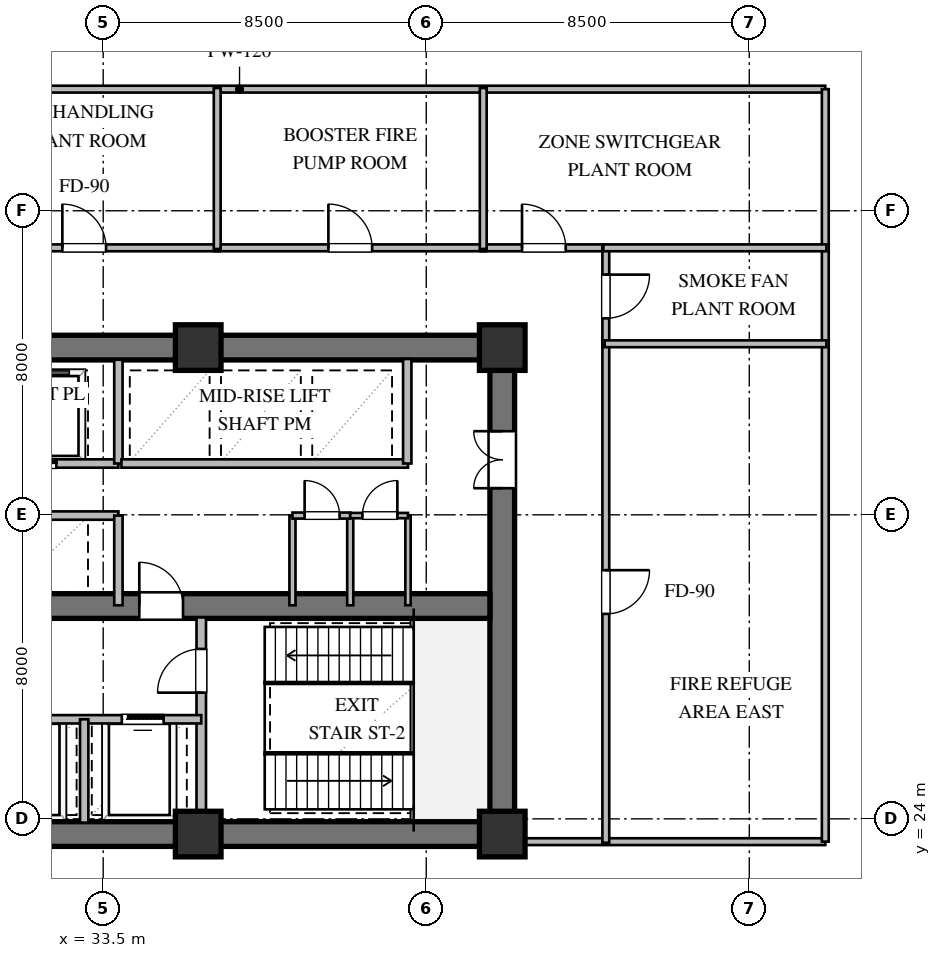
"""IFC4 building model, lengths in metres.
Left out: names, types, materials, properties, quantities, classifications, styles, units other than length and angle.
Written with IfcOpenShell. Run it as: python <this file> out.ifc"""

import sys

from ifc_helpers import new_model, si_unit, direction, frame, frame_2d, origin, origin_2d, place, context, subcontext, project, spatial, rectangle, extrude, element, fill, save


model = new_model("IFC4")
c1 = context("Model", 3, precision=1e-05, world=origin(), true_north=direction((0.0, 1.0)))
c2 = subcontext(c1, "Body", "Model", "MODEL_VIEW")
j1 = project(units=[si_unit("LENGTHUNIT", "METRE"), si_unit("PLANEANGLEUNIT", "RADIAN")], contexts=[c1])
p1 = place(None, origin())
s1 = spatial("IfcSite", under=j1, at=p1, CompositionType="ELEMENT")
p2 = place(p1, origin())
s2 = spatial("IfcBuilding", under=s1, at=p2, CompositionType="ELEMENT")
p3 = place(p2, frame((0.0, 0.0, 92.4)))
s3 = spatial("IfcBuildingStorey", under=s2, at=p3, CompositionType="ELEMENT", Elevation=92.4)
for number, where, z_axis, x_axis in (
    (1, (21.675, 23.6, 0.0), (0.0, 0.0, 1.0), (1.0, 0.0, 0.0)),
    (2, (21.675, 36.4, 0.0), (0.0, 0.0, 1.0), (1.0, 0.0, 0.0)),
):
    element("IfcWall", number, at=place(p3, frame(where, z_axis=z_axis, x_axis=x_axis)), inside=s3, PredefinedType="SHEAR", context=c2, shape_type="SweptSolid", body=[
        extrude(rectangle(XDim=22.65, YDim=0.65, at=frame_2d((11.325, 0.0))), origin(), (0.0, 0.0, 1.0), 5.08),
    ])
p4 = place(p3, frame((44.0, 23.925, 0.0), z_axis=(0.0, 0.0, 1.0), x_axis=(0.0, 1.0, 0.0)))
e3 = element("IfcWall", 3, at=p4, inside=s3, PredefinedType="SHEAR", context=c2, shape_type="SweptSolid", body=[
    extrude(rectangle(XDim=12.15, YDim=0.65, at=frame_2d((6.075, 0.0))), origin(), (0.0, 0.0, 1.0), 5.08),
])
p5 = place(p4, frame((8.775, 0.0, 0.0)))
e4 = element("IfcOpeningElement", 4, at=p5, cuts=e3, PredefinedType="OPENING", context=c2, shape_type="SweptSolid", body=[
    extrude(rectangle(XDim=1.5, YDim=2.15, at=frame_2d((0.75, 1.075))), frame((0.0, 0.335, 0.0), z_axis=(0.0, -1.0, 0.0), x_axis=(1.0, 0.0, 0.0)), (0.0, 0.0, 1.0), 0.67),
])
p6 = place(p3, frame((22.325, 29.6, 0.0), z_axis=(0.0, 0.0, 1.0), x_axis=(1.0, 0.0, 0.0)))
e5 = element("IfcWall", 5, at=p6, inside=s3, PredefinedType="SHEAR", context=c2, shape_type="SweptSolid", body=[
    extrude(rectangle(XDim=21.35, YDim=0.65, at=frame_2d((10.675, 0.0))), origin(), (0.0, 0.0, 1.0), 5.08),
])
p7 = place(p6, frame((12.125, 0.0, 0.0)))
e6 = element("IfcOpeningElement", 6, at=p7, cuts=e5, PredefinedType="OPENING", context=c2, shape_type="SweptSolid", body=[
    extrude(rectangle(XDim=1.15, YDim=2.1, at=frame_2d((0.575, 1.05))), frame((0.0, 0.335, 0.0), z_axis=(0.0, -1.0, 0.0), x_axis=(1.0, 0.0, 0.0)), (0.0, 0.0, 1.0), 0.67),
])
for number, where, z_axis, x_axis in (
    (7, (36.0, 23.6, 0.0), (0.0, 0.0, 1.0), (1.0, 0.0, 0.0)),
    (8, (44.0, 23.6, 0.0), (0.0, 0.0, 1.0), (1.0, 0.0, 0.0)),
    (9, (44.0, 36.4, 0.0), (0.0, 0.0, 1.0), (1.0, 0.0, 0.0)),
    (10, (36.0, 36.4, 0.0), (0.0, 0.0, 1.0), (1.0, 0.0, 0.0)),
):
    element("IfcColumn", number, at=place(p3, frame(where, z_axis=z_axis, x_axis=x_axis)), inside=s3, PredefinedType="COLUMN", context=c2, shape_type="SweptSolid", body=[
        extrude(rectangle(XDim=1.2, YDim=1.2, at=origin_2d()), origin(), (0.0, 0.0, 1.0), 5.4),
    ])
p8 = place(p3, frame((36.08, 23.9, 0.0), z_axis=(0.0, 0.0, 1.0), x_axis=(0.0, 1.0, 0.0)))
e11 = element("IfcWall", 11, at=p8, inside=s3, PredefinedType="SOLIDWALL", context=c2, shape_type="SweptSolid", body=[
    extrude(rectangle(XDim=5.4, YDim=0.25, at=frame_2d((2.7, 0.0))), origin(), (0.0, 0.0, 1.0), 5.08),
])
p9 = place(p8, frame((3.421, 0.0, 0.0)))
e12 = element("IfcOpeningElement", 12, at=p9, cuts=e11, PredefinedType="OPENING", context=c2, shape_type="SweptSolid", body=[
    extrude(rectangle(XDim=1.15, YDim=2.1, at=frame_2d((0.575, 1.05))), frame((0.0, 0.135, 0.0), z_axis=(0.0, -1.0, 0.0), x_axis=(1.0, 0.0, 0.0)), (0.0, 0.0, 1.0), 0.27),
])
p10 = place(p3, frame((29.92, 26.62, 0.0), z_axis=(0.0, 0.0, 1.0), x_axis=(1.0, 0.0, 0.0)))
e13 = element("IfcWall", 13, at=p10, inside=s3, PredefinedType="SOLIDWALL", context=c2, shape_type="SweptSolid", body=[
    extrude(rectangle(XDim=6.16, YDim=0.22, at=frame_2d((3.08, 0.0))), origin(), (0.0, 0.0, 1.0), 5.08),
])
p11 = place(p10, frame((0.99, 0.0, 0.0)))
e14 = element("IfcOpeningElement", 14, at=p11, cuts=e13, PredefinedType="OPENING", context=c2, shape_type="SweptSolid", body=[
    extrude(rectangle(XDim=1.1, YDim=2.1, at=frame_2d((0.55, 1.05))), frame((0.0, 0.12, 0.0), z_axis=(0.0, -1.0, 0.0), x_axis=(1.0, 0.0, 0.0)), (0.0, 0.0, 1.0), 0.24),
])
p12 = place(p10, frame((4.07, 0.0, 0.0)))
e15 = element("IfcOpeningElement", 15, at=p12, cuts=e13, PredefinedType="OPENING", context=c2, shape_type="SweptSolid", body=[
    extrude(rectangle(XDim=1.1, YDim=2.1, at=frame_2d((0.55, 1.05))), frame((0.0, 0.12, 0.0), z_axis=(0.0, -1.0, 0.0), x_axis=(1.0, 0.0, 0.0)), (0.0, 0.0, 1.0), 0.24),
])
p13 = place(p3, frame((33.0, 23.9, 0.0), z_axis=(0.0, 0.0, 1.0), x_axis=(0.0, 1.0, 0.0)))
e16 = element("IfcWall", 16, at=p13, inside=s3, PredefinedType="SOLIDWALL", context=c2, shape_type="SweptSolid", body=[
    extrude(rectangle(XDim=2.72, YDim=0.22, at=frame_2d((1.36, 0.0))), origin(), (0.0, 0.0, 1.0), 5.08),
])
p14 = place(p3, frame((26.1, 31.98, 0.0), z_axis=(0.0, 0.0, 1.0), x_axis=(1.0, 0.0, 0.0)))
e17 = element("IfcWall", 17, at=p14, inside=s3, PredefinedType="SOLIDWALL", context=c2, shape_type="SweptSolid", body=[
    extrude(rectangle(XDim=7.8, YDim=0.22, at=frame_2d((3.9, 0.0))), origin(), (0.0, 0.0, 1.0), 5.08),
])
p15 = place(p3, frame((33.9, 29.62, 0.0), z_axis=(0.0, 0.0, 1.0), x_axis=(0.0, 1.0, 0.0)))
e18 = element("IfcWall", 18, at=p15, inside=s3, PredefinedType="SOLIDWALL", context=c2, shape_type="SweptSolid", body=[
    extrude(rectangle(XDim=2.36, YDim=0.22, at=frame_2d((1.18, 0.0))), origin(), (0.0, 0.0, 1.0), 5.08),
])
p16 = place(p3, frame((26.1, 33.35, 0.0), z_axis=(0.0, 0.0, 1.0), x_axis=(1.0, 0.0, 0.0)))
e19 = element("IfcWall", 19, at=p16, inside=s3, PredefinedType="SOLIDWALL", context=c2, shape_type="SweptSolid", body=[
    extrude(rectangle(XDim=7.8, YDim=0.22, at=frame_2d((3.9, 0.0))), origin(), (0.0, 0.0, 1.0), 5.08),
])
p17 = place(p16, frame((1.4, 0.0, 0.0)))
e20 = element("IfcOpeningElement", 20, at=p17, cuts=e19, PredefinedType="OPENING", context=c2, shape_type="SweptSolid", body=[
    extrude(rectangle(XDim=1.1, YDim=2.1, at=frame_2d((0.55, 1.05))), frame((0.0, 0.12, 0.0), z_axis=(0.0, -1.0, 0.0), x_axis=(1.0, 0.0, 0.0)), (0.0, 0.0, 1.0), 0.24),
])
p18 = place(p16, frame((5.066, 0.0, 0.0)))
e21 = element("IfcOpeningElement", 21, at=p18, cuts=e19, PredefinedType="OPENING", context=c2, shape_type="SweptSolid", body=[
    extrude(rectangle(XDim=1.1, YDim=2.1, at=frame_2d((0.55, 1.05))), frame((0.0, 0.12, 0.0), z_axis=(0.0, -1.0, 0.0), x_axis=(1.0, 0.0, 0.0)), (0.0, 0.0, 1.0), 0.24),
])
p19 = place(p3, frame((33.9, 33.35, 0.0), z_axis=(0.0, 0.0, 1.0), x_axis=(0.0, 1.0, 0.0)))
e22 = element("IfcWall", 22, at=p19, inside=s3, PredefinedType="SOLIDWALL", context=c2, shape_type="SweptSolid", body=[
    extrude(rectangle(XDim=2.73, YDim=0.22, at=frame_2d((1.365, 0.0))), origin(), (0.0, 0.0, 1.0), 5.08),
])
p20 = place(p3, frame((33.98, 33.35, 0.0), z_axis=(0.0, 0.0, 1.0), x_axis=(1.0, 0.0, 0.0)))
e23 = element("IfcWall", 23, at=p20, inside=s3, PredefinedType="SOLIDWALL", context=c2, shape_type="SweptSolid", body=[
    extrude(rectangle(XDim=7.54, YDim=0.22, at=frame_2d((3.77, 0.0))), origin(), (0.0, 0.0, 1.0), 5.08),
])
p21 = place(p3, frame((41.5, 33.35, 0.0), z_axis=(0.0, 0.0, 1.0), x_axis=(0.0, 1.0, 0.0)))
e24 = element("IfcWall", 24, at=p21, inside=s3, PredefinedType="SOLIDWALL", context=c2, shape_type="SweptSolid", body=[
    extrude(rectangle(XDim=2.75, YDim=0.22, at=frame_2d((1.375, 0.0))), origin(), (0.0, 0.0, 1.0), 5.08),
])
for number, where, z_axis, x_axis in (
    (25, (38.48, 29.62, 0.0), (0.0, 0.0, 1.0), (0.0, 1.0, 0.0)),
    (26, (40.0, 29.62, 0.0), (0.0, 0.0, 1.0), (0.0, 1.0, 0.0)),
):
    element("IfcWall", number, at=place(p3, frame(where, z_axis=z_axis, x_axis=x_axis)), inside=s3, PredefinedType="PLUMBINGWALL", context=c2, shape_type="SweptSolid", body=[
        extrude(rectangle(XDim=2.36, YDim=0.16, at=frame_2d((1.18, 0.0))), origin(), (0.0, 0.0, 1.0), 5.08),
    ])
p22 = place(p3, frame((41.52, 29.62, 0.0), z_axis=(0.0, 0.0, 1.0), x_axis=(0.0, 1.0, 0.0)))
e27 = element("IfcWall", 27, at=p22, inside=s3, PredefinedType="PARTITIONING", context=c2, shape_type="SweptSolid", body=[
    extrude(rectangle(XDim=2.36, YDim=0.14, at=frame_2d((1.18, 0.0))), origin(), (0.0, 0.0, 1.0), 2.187),
])
p23 = place(p3, frame((38.48, 31.98, 0.0), z_axis=(0.0, 0.0, 1.0), x_axis=(1.0, 0.0, 0.0)))
e28 = element("IfcWall", 28, at=p23, inside=s3, PredefinedType="PLUMBINGWALL", context=c2, shape_type="SweptSolid", body=[
    extrude(rectangle(XDim=1.52, YDim=0.16, at=frame_2d((0.76, 0.0))), origin(), (0.0, 0.0, 1.0), 5.08),
])
p24 = place(p23, frame((0.32, 0.0, 0.0)))
e29 = element("IfcOpeningElement", 29, at=p24, cuts=e28, PredefinedType="OPENING", context=c2, shape_type="SweptSolid", body=[
    extrude(rectangle(XDim=0.92, YDim=2.1, at=frame_2d((0.46, 1.05))), frame((0.0, 0.09, 0.0), z_axis=(0.0, -1.0, 0.0), x_axis=(1.0, 0.0, 0.0)), (0.0, 0.0, 1.0), 0.18),
])
p25 = place(p3, frame((40.0, 31.98, 0.0), z_axis=(0.0, 0.0, 1.0), x_axis=(1.0, 0.0, 0.0)))
e30 = element("IfcWall", 30, at=p25, inside=s3, PredefinedType="PARTITIONING", context=c2, shape_type="SweptSolid", body=[
    extrude(rectangle(XDim=1.52, YDim=0.14, at=frame_2d((0.76, 0.0))), origin(), (0.0, 0.0, 1.0), 5.08),
])
p26 = place(p25, frame((0.32, 0.0, 0.0)))
e31 = element("IfcOpeningElement", 31, at=p26, cuts=e30, PredefinedType="OPENING", context=c2, shape_type="SweptSolid", body=[
    extrude(rectangle(XDim=0.92, YDim=2.1, at=frame_2d((0.46, 1.05))), frame((0.0, 0.08, 0.0), z_axis=(0.0, -1.0, 0.0), x_axis=(1.0, 0.0, 0.0)), (0.0, 0.0, 1.0), 0.16),
])
p27 = place(p3, frame((21.675, 43.2, 0.0), z_axis=(0.0, 0.0, 1.0), x_axis=(1.0, 0.0, 0.0)))
e32 = element("IfcWall", 32, at=p27, inside=s3, PredefinedType="PARTITIONING", context=c2, shape_type="SweptSolid", body=[
    extrude(rectangle(XDim=30.825, YDim=0.18, at=frame_2d((15.413, 0.0))), origin(), (0.0, 0.0, 1.0), 5.08),
])
p28 = place(p3, frame((44.325, 23.4, 0.0), z_axis=(0.0, 0.0, 1.0), x_axis=(1.0, 0.0, 0.0)))
e33 = element("IfcWall", 33, at=p28, inside=s3, PredefinedType="PARTITIONING", context=c2, shape_type="SweptSolid", body=[
    extrude(rectangle(XDim=8.175, YDim=0.18, at=frame_2d((4.087, 0.0))), origin(), (0.0, 0.0, 1.0), 3.57),
])
p29 = place(p3, frame((52.5, 23.4, 0.0), z_axis=(0.0, 0.0, 1.0), x_axis=(0.0, 1.0, 0.0)))
e34 = element("IfcWall", 34, at=p29, inside=s3, PredefinedType="PARTITIONING", context=c2, shape_type="SweptSolid", body=[
    extrude(rectangle(XDim=19.8, YDim=0.18, at=frame_2d((9.9, 0.0))), origin(), (0.0, 0.0, 1.0), 5.08),
])
p30 = place(p3, frame((46.725, 36.565, 0.0), z_axis=(0.0, 0.0, 1.0), x_axis=(0.0, -1.0, 0.0)))
e35 = element("IfcWall", 35, at=p30, inside=s3, PredefinedType="PARTITIONING", context=c2, shape_type="SweptSolid", body=[
    extrude(rectangle(XDim=13.195, YDim=0.18, at=frame_2d((6.597, 0.0))), origin(), (0.0, 0.0, 1.0), 5.08),
])
p31 = place(p30, frame((6.022, 0.0, 0.0)))
e36 = element("IfcOpeningElement", 36, at=p31, cuts=e35, PredefinedType="OPENING", context=c2, shape_type="SweptSolid", body=[
    extrude(rectangle(XDim=1.15, YDim=2.1, at=frame_2d((0.575, 1.05))), frame((0.0, 0.1, 0.0), z_axis=(0.0, -1.0, 0.0), x_axis=(1.0, 0.0, 0.0)), (0.0, 0.0, 1.0), 0.2),
])
p32 = place(p3, frame((29.435, 39.025, 0.0), z_axis=(0.0, 0.0, 1.0), x_axis=(1.0, 0.0, 0.0)))
e37 = element("IfcWall", 37, at=p32, inside=s3, PredefinedType="PARTITIONING", context=c2, shape_type="SweptSolid", body=[
    extrude(rectangle(XDim=7.13, YDim=0.18, at=frame_2d((3.565, 0.0))), origin(), (0.0, 0.0, 1.0), 5.08),
])
p33 = place(p32, frame((2.99, 0.0, 0.0)))
e38 = element("IfcOpeningElement", 38, at=p33, cuts=e37, PredefinedType="OPENING", context=c2, shape_type="SweptSolid", body=[
    extrude(rectangle(XDim=1.15, YDim=2.1, at=frame_2d((0.575, 1.05))), frame((0.0, 0.1, 0.0), z_axis=(0.0, -1.0, 0.0), x_axis=(1.0, 0.0, 0.0)), (0.0, 0.0, 1.0), 0.2),
])
p34 = place(p3, frame((36.435, 39.025, 0.0), z_axis=(0.0, 0.0, 1.0), x_axis=(1.0, 0.0, 0.0)))
e39 = element("IfcWall", 39, at=p34, inside=s3, PredefinedType="PARTITIONING", context=c2, shape_type="SweptSolid", body=[
    extrude(rectangle(XDim=7.13, YDim=0.18, at=frame_2d((3.565, 0.0))), origin(), (0.0, 0.0, 1.0), 5.08),
])
p35 = place(p34, frame((2.99, 0.0, 0.0)))
e40 = element("IfcOpeningElement", 40, at=p35, cuts=e39, PredefinedType="OPENING", context=c2, shape_type="SweptSolid", body=[
    extrude(rectangle(XDim=1.15, YDim=2.1, at=frame_2d((0.575, 1.05))), frame((0.0, 0.1, 0.0), z_axis=(0.0, -1.0, 0.0), x_axis=(1.0, 0.0, 0.0)), (0.0, 0.0, 1.0), 0.2),
])
p36 = place(p3, frame((43.435, 39.025, 0.0), z_axis=(0.0, 0.0, 1.0), x_axis=(1.0, 0.0, 0.0)))
e41 = element("IfcWall", 41, at=p36, inside=s3, PredefinedType="PARTITIONING", context=c2, shape_type="SweptSolid", body=[
    extrude(rectangle(XDim=3.32, YDim=0.18, at=frame_2d((1.66, 0.0))), origin(), (0.0, 0.0, 1.0), 5.08),
])
p37 = place(p36, frame((1.085, 0.0, 0.0)))
e42 = element("IfcOpeningElement", 42, at=p37, cuts=e41, PredefinedType="OPENING", context=c2, shape_type="SweptSolid", body=[
    extrude(rectangle(XDim=1.15, YDim=2.1, at=frame_2d((0.575, 1.05))), frame((0.0, 0.1, 0.0), z_axis=(0.0, -1.0, 0.0), x_axis=(1.0, 0.0, 0.0)), (0.0, 0.0, 1.0), 0.2),
])
p38 = place(p3, frame((46.725, 39.055, 0.0), z_axis=(0.0, 0.0, 1.0), x_axis=(0.0, -1.0, 0.0)))
e43 = element("IfcWall", 43, at=p38, inside=s3, PredefinedType="PARTITIONING", context=c2, shape_type="SweptSolid", body=[
    extrude(rectangle(XDim=2.62, YDim=0.18, at=frame_2d((1.31, 0.0))), origin(), (0.0, 0.0, 1.0), 5.08),
])
p39 = place(p38, frame((0.735, 0.0, 0.0)))
e44 = element("IfcOpeningElement", 44, at=p39, cuts=e43, PredefinedType="OPENING", context=c2, shape_type="SweptSolid", body=[
    extrude(rectangle(XDim=1.15, YDim=2.1, at=frame_2d((0.575, 1.05))), frame((0.0, 0.1, 0.0), z_axis=(0.0, -1.0, 0.0), x_axis=(1.0, 0.0, 0.0)), (0.0, 0.0, 1.0), 0.2),
])
p40 = place(p3, frame((46.695, 36.5, 0.0), z_axis=(0.0, 0.0, 1.0), x_axis=(1.0, 0.0, 0.0)))
e45 = element("IfcWall", 45, at=p40, inside=s3, PredefinedType="PARTITIONING", context=c2, shape_type="SweptSolid", body=[
    extrude(rectangle(XDim=5.835, YDim=0.18, at=frame_2d((2.917, 0.0))), origin(), (0.0, 0.0, 1.0), 3.57),
])
p41 = place(p3, frame((36.5, 43.23, 0.0), z_axis=(0.0, 0.0, 1.0), x_axis=(0.0, -1.0, 0.0)))
e46 = element("IfcWall", 46, at=p41, inside=s3, PredefinedType="PARTITIONING", context=c2, shape_type="SweptSolid", body=[
    extrude(rectangle(XDim=4.235, YDim=0.18, at=frame_2d((2.117, 0.0))), origin(), (0.0, 0.0, 1.0), 5.08),
])
p42 = place(p3, frame((43.5, 43.23, 0.0), z_axis=(0.0, 0.0, 1.0), x_axis=(0.0, -1.0, 0.0)))
e47 = element("IfcWall", 47, at=p42, inside=s3, PredefinedType="PARTITIONING", context=c2, shape_type="SweptSolid", body=[
    extrude(rectangle(XDim=4.235, YDim=0.18, at=frame_2d((2.117, 0.0))), origin(), (0.0, 0.0, 1.0), 3.57),
])
p43 = place(p3, frame((52.53, 39.025, 0.0), z_axis=(0.0, 0.0, 1.0), x_axis=(-1.0, 0.0, 0.0)))
e48 = element("IfcWall", 48, at=p43, inside=s3, PredefinedType="PARTITIONING", context=c2, shape_type="SweptSolid", body=[
    extrude(rectangle(XDim=5.87, YDim=0.18, at=frame_2d((2.935, 0.0))), origin(), (0.0, 0.0, 1.0), 5.08),
])
p44 = place(p9, origin())
e49 = element("IfcDoor", 49, at=p44, inside=s3, OperationType="SINGLE_SWING_LEFT", PredefinedType="DOOR", context=c2, shape_type="SweptSolid", body=[
    extrude(rectangle(XDim=1.15, YDim=2.1, at=frame_2d((0.575, 1.05))), frame((0.0, 0.025, 0.0), z_axis=(0.0, -1.0, 0.0), x_axis=(1.0, 0.0, 0.0)), (0.0, 0.0, 1.0), 0.05),
])
fill(e12, e49)
p45 = place(p12, origin())
e50 = element("IfcDoor", 50, at=p45, inside=s3, OperationType="SLIDING_TO_RIGHT", PredefinedType="DOOR", context=c2, shape_type="SweptSolid", body=[
    extrude(rectangle(XDim=1.1, YDim=2.1, at=frame_2d((0.55, 1.05))), frame((0.0, 0.025, 0.0), z_axis=(0.0, -1.0, 0.0), x_axis=(1.0, 0.0, 0.0)), (0.0, 0.0, 1.0), 0.05),
])
fill(e15, e50)
p46 = place(p7, origin())
e51 = element("IfcDoor", 51, at=p46, inside=s3, OperationType="SINGLE_SWING_LEFT", PredefinedType="DOOR", context=c2, shape_type="SweptSolid", body=[
    extrude(rectangle(XDim=1.15, YDim=2.1, at=frame_2d((0.575, 1.05))), frame((0.0, 0.025, 0.0), z_axis=(0.0, -1.0, 0.0), x_axis=(1.0, 0.0, 0.0)), (0.0, 0.0, 1.0), 0.05),
])
fill(e6, e51)
p47 = place(p5, origin())
e52 = element("IfcDoor", 52, at=p47, inside=s3, OperationType="DOUBLE_DOOR_SINGLE_SWING", PredefinedType="DOOR", context=c2, shape_type="SweptSolid", body=[
    extrude(rectangle(XDim=1.5, YDim=2.15, at=frame_2d((0.75, 1.075))), frame((0.0, 0.025, 0.0), z_axis=(0.0, -1.0, 0.0), x_axis=(1.0, 0.0, 0.0)), (0.0, 0.0, 1.0), 0.05),
])
fill(e4, e52)
p48 = place(p18, origin())
e53 = element("IfcDoor", 53, at=p48, inside=s3, OperationType="SLIDING_TO_RIGHT", PredefinedType="DOOR", context=c2, shape_type="SweptSolid", body=[
    extrude(rectangle(XDim=1.1, YDim=2.1, at=frame_2d((0.55, 1.05))), frame((0.0, 0.025, 0.0), z_axis=(0.0, -1.0, 0.0), x_axis=(1.0, 0.0, 0.0)), (0.0, 0.0, 1.0), 0.05),
])
fill(e21, e53)
p49 = place(p24, origin())
e54 = element("IfcDoor", 54, at=p49, inside=s3, OperationType="SINGLE_SWING_LEFT", PredefinedType="DOOR", context=c2, shape_type="SweptSolid", body=[
    extrude(rectangle(XDim=0.92, YDim=2.1, at=frame_2d((0.46, 1.05))), frame((0.0, 0.025, 0.0), z_axis=(0.0, -1.0, 0.0), x_axis=(1.0, 0.0, 0.0)), (0.0, 0.0, 1.0), 0.05),
])
fill(e29, e54)
p50 = place(p26, origin())
e55 = element("IfcDoor", 55, at=p50, inside=s3, OperationType="SINGLE_SWING_RIGHT", PredefinedType="DOOR", context=c2, shape_type="SweptSolid", body=[
    extrude(rectangle(XDim=0.92, YDim=2.1, at=frame_2d((0.46, 1.05))), frame((0.0, 0.025, 0.0), z_axis=(0.0, -1.0, 0.0), x_axis=(1.0, 0.0, 0.0)), (0.0, 0.0, 1.0), 0.05),
])
fill(e31, e55)
p51 = place(p31, origin())
e56 = element("IfcDoor", 56, at=p51, inside=s3, OperationType="SINGLE_SWING_LEFT", PredefinedType="DOOR", context=c2, shape_type="SweptSolid", body=[
    extrude(rectangle(XDim=1.15, YDim=2.1, at=frame_2d((0.575, 1.05))), frame((0.0, 0.025, 0.0), z_axis=(0.0, -1.0, 0.0), x_axis=(1.0, 0.0, 0.0)), (0.0, 0.0, 1.0), 0.05),
])
fill(e36, e56)
p52 = place(p33, origin())
e57 = element("IfcDoor", 57, at=p52, inside=s3, OperationType="SINGLE_SWING_LEFT", PredefinedType="DOOR", context=c2, shape_type="SweptSolid", body=[
    extrude(rectangle(XDim=1.15, YDim=2.1, at=frame_2d((0.575, 1.05))), frame((0.0, 0.025, 0.0), z_axis=(0.0, -1.0, 0.0), x_axis=(1.0, 0.0, 0.0)), (0.0, 0.0, 1.0), 0.05),
])
fill(e38, e57)
p53 = place(p35, origin())
e58 = element("IfcDoor", 58, at=p53, inside=s3, OperationType="SINGLE_SWING_LEFT", PredefinedType="DOOR", context=c2, shape_type="SweptSolid", body=[
    extrude(rectangle(XDim=1.15, YDim=2.1, at=frame_2d((0.575, 1.05))), frame((0.0, 0.025, 0.0), z_axis=(0.0, -1.0, 0.0), x_axis=(1.0, 0.0, 0.0)), (0.0, 0.0, 1.0), 0.05),
])
fill(e40, e58)
p54 = place(p37, origin())
e59 = element("IfcDoor", 59, at=p54, inside=s3, OperationType="SINGLE_SWING_LEFT", PredefinedType="DOOR", context=c2, shape_type="SweptSolid", body=[
    extrude(rectangle(XDim=1.15, YDim=2.1, at=frame_2d((0.575, 1.05))), frame((0.0, 0.025, 0.0), z_axis=(0.0, -1.0, 0.0), x_axis=(1.0, 0.0, 0.0)), (0.0, 0.0, 1.0), 0.05),
])
fill(e42, e59)
p55 = place(p39, origin())
e60 = element("IfcDoor", 60, at=p55, inside=s3, OperationType="SINGLE_SWING_LEFT", PredefinedType="DOOR", context=c2, shape_type="SweptSolid", body=[
    extrude(rectangle(XDim=1.15, YDim=2.1, at=frame_2d((0.575, 1.05))), frame((0.0, 0.025, 0.0), z_axis=(0.0, -1.0, 0.0), x_axis=(1.0, 0.0, 0.0)), (0.0, 0.0, 1.0), 0.05),
])
fill(e44, e60)
save(model, sys.argv[1])
